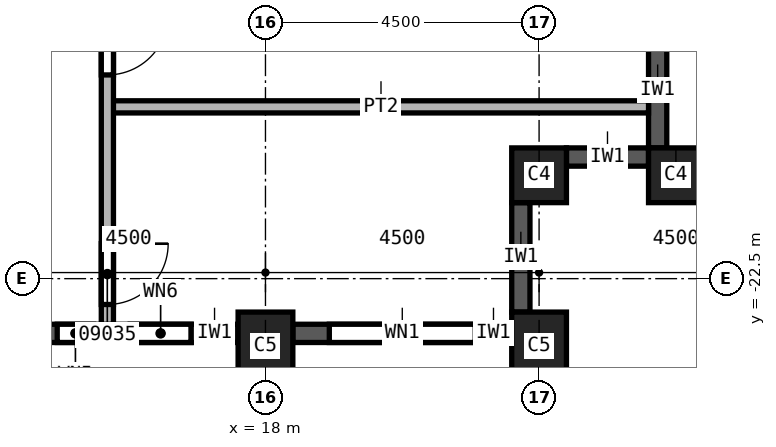
"""IFC4 building model, lengths in metres.
Left out: names, types, materials, properties, quantities, classifications, styles, units other than length and angle.
Written with IfcOpenShell. Run it as: python <this file> out.ifc"""

import sys

from ifc_helpers import new_model, si_unit, direction, frame, frame_2d, origin, origin_2d, place, context, subcontext, project, spatial, rectangle, extrude, element, fill, save


model = new_model("IFC4")
c1 = context("Model", 3, precision=1e-05, world=origin(), true_north=direction((0.0, 1.0)))
c2 = subcontext(c1, "Body", "Model", "MODEL_VIEW")
j1 = project(units=[si_unit("LENGTHUNIT", "METRE"), si_unit("PLANEANGLEUNIT", "RADIAN")], contexts=[c1])
p1 = place(None, origin())
s1 = spatial("IfcSite", under=j1, at=p1, CompositionType="ELEMENT")
p2 = place(p1, origin())
s2 = spatial("IfcBuilding", under=s1, at=p2, CompositionType="ELEMENT")
p3 = place(p2, frame((0.0, 0.0, 162.0)))
s3 = spatial("IfcBuildingStorey", under=s2, at=p3, CompositionType="ELEMENT", Elevation=162.0)
for number, where, z_axis, x_axis in (
    (1, (18.0, -23.6, 0.0), (0.0, 0.0, 1.0), (1.0, 0.0, 0.0)),
    (2, (22.5, -23.6, 0.0), (0.0, 0.0, 1.0), (1.0, 0.0, 0.0)),
):
    element("IfcColumn", number, at=place(p3, frame(where, z_axis=z_axis, x_axis=x_axis)), inside=s3, PredefinedType="COLUMN", context=c2, shape_type="SweptSolid", body=[
        extrude(rectangle(XDim=0.9, YDim=1.1, at=origin_2d()), origin(), (0.0, 0.0, 1.0), 3.7),
    ])
for number, where, z_axis, x_axis in (
    (3, (22.5, -20.8, 0.0), (0.0, 0.0, 1.0), (1.0, 0.0, 0.0)),
    (4, (24.75, -20.8, 0.0), (0.0, 0.0, 1.0), (1.0, 0.0, 0.0)),
):
    element("IfcColumn", number, at=place(p3, frame(where, z_axis=z_axis, x_axis=x_axis)), inside=s3, PredefinedType="COLUMN", context=c2, shape_type="SweptSolid", body=[
        extrude(rectangle(XDim=0.9, YDim=0.9, at=origin_2d()), origin(), (0.0, 0.0, 1.0), 3.7),
    ])
p4 = place(p3, frame((13.95, -23.4, 0.0), z_axis=(0.0, 0.0, 1.0), x_axis=(1.0, 0.0, 0.0)))
e5 = element("IfcWall", 5, at=p4, inside=s3, PredefinedType="SOLIDWALL", context=c2, shape_type="SweptSolid", body=[
    extrude(rectangle(XDim=3.6, YDim=0.3, at=frame_2d((1.8, 0.0))), origin(), (0.0, 0.0, 1.0), 3.1),
])
p5 = place(p4, frame((0.625, 0.0, 0.8)))
e6 = element("IfcOpeningElement", 6, at=p5, cuts=e5, PredefinedType="OPENING", context=c2, shape_type="SweptSolid", body=[
    extrude(rectangle(XDim=0.6, YDim=1.95, at=frame_2d((0.3, 0.975))), frame((0.0, 0.15, 0.0), z_axis=(0.0, -1.0, 0.0), x_axis=(1.0, 0.0, 0.0)), (0.0, 0.0, 1.0), 0.3),
])
p6 = place(p4, frame((1.825, 0.0, 0.8)))
e7 = element("IfcOpeningElement", 7, at=p6, cuts=e5, PredefinedType="OPENING", context=c2, shape_type="SweptSolid", body=[
    extrude(rectangle(XDim=1.0, YDim=1.95, at=frame_2d((0.5, 0.975))), frame((0.0, 0.15, 0.0), z_axis=(0.0, -1.0, 0.0), x_axis=(1.0, 0.0, 0.0)), (0.0, 0.0, 1.0), 0.3),
])
p7 = place(p3, frame((18.45, -23.4, 0.0), z_axis=(0.0, 0.0, 1.0), x_axis=(1.0, 0.0, 0.0)))
e8 = element("IfcWall", 8, at=p7, inside=s3, PredefinedType="SOLIDWALL", context=c2, shape_type="SweptSolid", body=[
    extrude(rectangle(XDim=3.6, YDim=0.3, at=frame_2d((1.8, 0.0))), origin(), (0.0, 0.0, 1.0), 3.1),
])
p8 = place(p7, frame((0.6, 0.0, 0.8)))
e9 = element("IfcOpeningElement", 9, at=p8, cuts=e8, PredefinedType="OPENING", context=c2, shape_type="SweptSolid", body=[
    extrude(rectangle(XDim=2.4, YDim=1.95, at=frame_2d((1.2, 0.975))), frame((0.0, 0.15, 0.0), z_axis=(0.0, -1.0, 0.0), x_axis=(1.0, 0.0, 0.0)), (0.0, 0.0, 1.0), 0.3),
])
p9 = place(p3, frame((22.2, -23.05, 0.0), z_axis=(0.0, 0.0, 1.0), x_axis=(0.0, 1.0, 0.0)))
e10 = element("IfcWall", 10, at=p9, inside=s3, PredefinedType="SOLIDWALL", context=c2, shape_type="SweptSolid", body=[
    extrude(rectangle(XDim=1.8, YDim=0.3, at=frame_2d((0.9, 0.0))), origin(), (0.0, 0.0, 1.0), 3.1),
])
p10 = place(p3, frame((22.95, -20.5, 0.0), z_axis=(0.0, 0.0, 1.0), x_axis=(1.0, 0.0, 0.0)))
e11 = element("IfcWall", 11, at=p10, inside=s3, PredefinedType="SOLIDWALL", context=c2, shape_type="SweptSolid", body=[
    extrude(rectangle(XDim=1.35, YDim=0.3, at=frame_2d((0.675, 0.0))), origin(), (0.0, 0.0, 1.0), 3.1),
])
p11 = place(p3, frame((24.45, -20.35, 0.0), z_axis=(0.0, 0.0, 1.0), x_axis=(0.0, 1.0, 0.0)))
e12 = element("IfcWall", 12, at=p11, inside=s3, PredefinedType="SOLIDWALL", context=c2, shape_type="SweptSolid", body=[
    extrude(rectangle(XDim=1.9, YDim=0.3, at=frame_2d((0.95, 0.0))), origin(), (0.0, 0.0, 1.0), 3.1),
])
p12 = place(p3, frame((15.4, -19.675, 0.0), z_axis=(0.0, 0.0, 1.0), x_axis=(1.0, 0.0, 0.0)))
e13 = element("IfcWall", 13, at=p12, inside=s3, PredefinedType="PARTITIONING", context=c2, shape_type="SweptSolid", body=[
    extrude(rectangle(XDim=8.9, YDim=0.2, at=frame_2d((4.45, 0.0))), origin(), (0.0, 0.0, 1.0), 3.7),
])
p13 = place(p3, frame((15.4, -3.65, 0.0), z_axis=(0.0, 0.0, 1.0), x_axis=(0.0, -1.0, 0.0)))
e14 = element("IfcWall", 14, at=p13, inside=s3, PredefinedType="PARTITIONING", context=c2, shape_type="SweptSolid", body=[
    extrude(rectangle(XDim=19.6, YDim=0.2, at=frame_2d((9.8, 0.0))), origin(), (0.0, 0.0, 1.0), 3.7),
])
p14 = place(p13, frame((18.275, 0.0, 0.0)))
e15 = element("IfcOpeningElement", 15, at=p14, cuts=e14, PredefinedType="OPENING", context=c2, shape_type="SweptSolid", body=[
    extrude(rectangle(XDim=1.0, YDim=2.1, at=frame_2d((0.5, 1.05))), frame((0.0, 0.1, 0.0), z_axis=(0.0, -1.0, 0.0), x_axis=(1.0, 0.0, 0.0)), (0.0, 0.0, 1.0), 0.2),
])
p15 = place(p13, frame((14.5, 0.0, 0.0)))
e16 = element("IfcOpeningElement", 16, at=p15, cuts=e14, PredefinedType="OPENING", context=c2, shape_type="SweptSolid", body=[
    extrude(rectangle(XDim=1.0, YDim=2.1, at=frame_2d((0.5, 1.05))), frame((0.0, 0.1, 0.0), z_axis=(0.0, -1.0, 0.0), x_axis=(1.0, 0.0, 0.0)), (0.0, 0.0, 1.0), 0.2),
])
p16 = place(p13, frame((8.2, 0.0, 0.0)))
e17 = element("IfcOpeningElement", 17, at=p16, cuts=e14, PredefinedType="OPENING", context=c2, shape_type="SweptSolid", body=[
    extrude(rectangle(XDim=1.0, YDim=2.1, at=frame_2d((0.5, 1.05))), frame((0.0, 0.1, 0.0), z_axis=(0.0, -1.0, 0.0), x_axis=(1.0, 0.0, 0.0)), (0.0, 0.0, 1.0), 0.2),
])
p17 = place(p8, origin())
e18 = element("IfcWindow", 18, at=p17, inside=s3, PartitioningType="SINGLE_PANEL", PredefinedType="WINDOW", context=c2, shape_type="SweptSolid", body=[
    extrude(rectangle(XDim=2.4, YDim=1.95, at=frame_2d((1.2, 0.975))), frame((0.0, 0.03, 0.0), z_axis=(0.0, -1.0, 0.0), x_axis=(1.0, 0.0, 0.0)), (0.0, 0.0, 1.0), 0.06),
])
fill(e9, e18)
p18 = place(p14, origin())
e19 = element("IfcDoor", 19, at=p18, inside=s3, OperationType="SINGLE_SWING_RIGHT", PredefinedType="DOOR", context=c2, shape_type="SweptSolid", body=[
    extrude(rectangle(XDim=1.0, YDim=2.1, at=frame_2d((0.5, 1.05))), frame((0.0, 0.025, 0.0), z_axis=(0.0, -1.0, 0.0), x_axis=(1.0, 0.0, 0.0)), (0.0, 0.0, 1.0), 0.05),
])
fill(e15, e19)
p19 = place(p15, origin())
e20 = element("IfcDoor", 20, at=p19, inside=s3, OperationType="SINGLE_SWING_LEFT", PredefinedType="DOOR", context=c2, shape_type="SweptSolid", body=[
    extrude(rectangle(XDim=1.0, YDim=2.1, at=frame_2d((0.5, 1.05))), frame((0.0, 0.025, 0.0), z_axis=(0.0, -1.0, 0.0), x_axis=(1.0, 0.0, 0.0)), (0.0, 0.0, 1.0), 0.05),
])
fill(e16, e20)
p20 = place(p5, origin())
e21 = element("IfcWindow", 21, at=p20, inside=s3, PartitioningType="SINGLE_PANEL", PredefinedType="WINDOW", context=c2, shape_type="SweptSolid", body=[
    extrude(rectangle(XDim=0.6, YDim=1.95, at=frame_2d((0.3, 0.975))), frame((0.0, 0.03, 0.0), z_axis=(0.0, -1.0, 0.0), x_axis=(1.0, 0.0, 0.0)), (0.0, 0.0, 1.0), 0.06),
])
fill(e6, e21)
p21 = place(p6, origin())
e22 = element("IfcWindow", 22, at=p21, inside=s3, PartitioningType="SINGLE_PANEL", PredefinedType="WINDOW", context=c2, shape_type="SweptSolid", body=[
    extrude(rectangle(XDim=1.0, YDim=1.95, at=frame_2d((0.5, 0.975))), frame((0.0, 0.03, 0.0), z_axis=(0.0, -1.0, 0.0), x_axis=(1.0, 0.0, 0.0)), (0.0, 0.0, 1.0), 0.06),
])
fill(e7, e22)
save(model, sys.argv[1])
